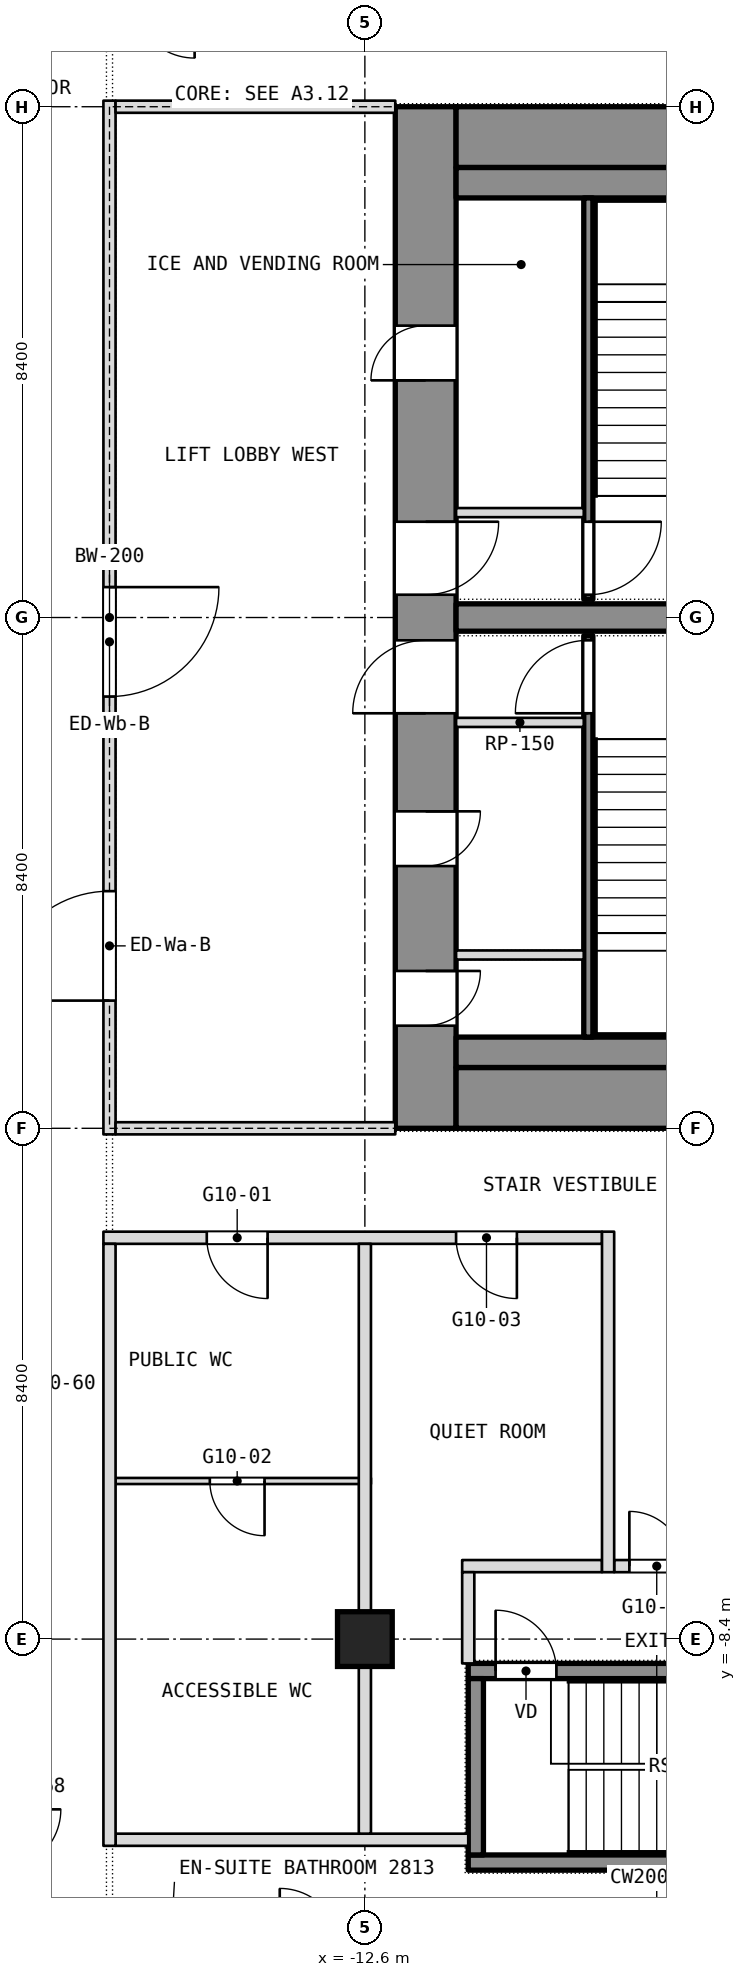
"""IFC4 building model, lengths in metres.
Left out: names, types, materials, properties, quantities, classifications, styles, units other than length and angle.
Written with IfcOpenShell. Run it as: python <this file> out.ifc"""

import sys

from ifc_helpers import new_model, si_unit, direction, frame, frame_2d, origin, origin_2d, place, context, subcontext, project, spatial, rectangle, extrude, element, fill, save


model = new_model("IFC4")
c1 = context("Model", 3, precision=1e-05, world=origin(), true_north=direction((0.0, 1.0)))
c2 = subcontext(c1, "Body", "Model", "MODEL_VIEW")
j1 = project(units=[si_unit("LENGTHUNIT", "METRE"), si_unit("PLANEANGLEUNIT", "RADIAN")], contexts=[c1])
p1 = place(None, origin())
s1 = spatial("IfcSite", under=j1, at=p1, CompositionType="ELEMENT")
p2 = place(p1, origin())
s2 = spatial("IfcBuilding", under=s1, at=p2, CompositionType="ELEMENT")
p3 = place(p2, frame((0.0, 0.0, 126.5)))
s3 = spatial("IfcBuildingStorey", under=s2, at=p3, CompositionType="ELEMENT", Elevation=126.5)
p4 = place(p3, frame((-11.6, 0.0, 0.0), z_axis=(0.0, 0.0, 1.0), x_axis=(0.0, 1.0, 0.0)))
e1 = element("IfcWall", 1, at=p4, inside=s3, PredefinedType="SHEAR", context=c2, shape_type="SweptSolid", body=[
    extrude(rectangle(XDim=16.8, YDim=1.0, at=frame_2d((8.4, 0.0))), origin(), (0.0, 0.0, 1.0), 3.6),
])
p5 = place(p4, frame((1.688, 0.0, 0.0)))
e2 = element("IfcOpeningElement", 2, at=p5, cuts=e1, PredefinedType="OPENING", context=c2, shape_type="SweptSolid", body=[
    extrude(rectangle(XDim=0.9, YDim=2.1, at=frame_2d((0.45, 1.05))), frame((0.0, 0.5, 0.0), z_axis=(0.0, -1.0, 0.0), x_axis=(1.0, 0.0, 0.0)), (0.0, 0.0, 1.0), 1.0),
])
p6 = place(p4, frame((4.312, 0.0, 0.0)))
e3 = element("IfcOpeningElement", 3, at=p6, cuts=e1, PredefinedType="OPENING", context=c2, shape_type="SweptSolid", body=[
    extrude(rectangle(XDim=0.9, YDim=2.1, at=frame_2d((0.45, 1.05))), frame((0.0, 0.5, 0.0), z_axis=(0.0, -1.0, 0.0), x_axis=(1.0, 0.0, 0.0)), (0.0, 0.0, 1.0), 1.0),
])
p7 = place(p4, frame((6.825, 0.0, 0.0)))
e4 = element("IfcOpeningElement", 4, at=p7, cuts=e1, PredefinedType="OPENING", context=c2, shape_type="SweptSolid", body=[
    extrude(rectangle(XDim=1.2, YDim=2.1, at=frame_2d((0.6, 1.05))), frame((0.0, 0.5, 0.0), z_axis=(0.0, -1.0, 0.0), x_axis=(1.0, 0.0, 0.0)), (0.0, 0.0, 1.0), 1.0),
])
p8 = place(p4, frame((12.3, 0.0, 0.0)))
e5 = element("IfcOpeningElement", 5, at=p8, cuts=e1, PredefinedType="OPENING", context=c2, shape_type="SweptSolid", body=[
    extrude(rectangle(XDim=0.9, YDim=2.1, at=frame_2d((0.45, 1.05))), frame((0.0, 0.5, 0.0), z_axis=(0.0, -1.0, 0.0), x_axis=(1.0, 0.0, 0.0)), (0.0, 0.0, 1.0), 1.0),
])
p9 = place(p4, frame((8.775, 0.0, 0.0)))
e6 = element("IfcOpeningElement", 6, at=p9, cuts=e1, PredefinedType="OPENING", context=c2, shape_type="SweptSolid", body=[
    extrude(rectangle(XDim=1.2, YDim=2.1, at=frame_2d((0.6, 1.05))), frame((0.0, 0.5, 0.0), z_axis=(0.0, -1.0, 0.0), x_axis=(1.0, 0.0, 0.0)), (0.0, 0.0, 1.0), 1.0),
])
for number, where, z_axis, x_axis in (
    (7, (-11.1, 0.5, 0.0), (0.0, 0.0, 1.0), (1.0, 0.0, 0.0)),
    (8, (-11.1, 16.3, 0.0), (0.0, 0.0, 1.0), (1.0, 0.0, 0.0)),
):
    element("IfcWall", number, at=place(p3, frame(where, z_axis=z_axis, x_axis=x_axis)), inside=s3, PredefinedType="SHEAR", context=c2, shape_type="SweptSolid", body=[
        extrude(rectangle(XDim=22.2, YDim=1.0, at=frame_2d((11.1, 0.0))), origin(), (0.0, 0.0, 1.0), 3.6),
    ])
p10 = place(p3, frame((-11.1, 8.4, 0.0), z_axis=(0.0, 0.0, 1.0), x_axis=(1.0, 0.0, 0.0)))
e9 = element("IfcWall", 9, at=p10, inside=s3, PredefinedType="SHEAR", context=c2, shape_type="SweptSolid", body=[
    extrude(rectangle(XDim=6.675, YDim=0.45, at=frame_2d((3.337, 0.0))), origin(), (0.0, 0.0, 1.0), 3.6),
])
p11 = place(p3, frame((-12.6, -8.4, 0.0), z_axis=(0.0, 0.0, 1.0), x_axis=(1.0, 0.0, 0.0)))
e10 = element("IfcColumn", 10, at=p11, inside=s3, PredefinedType="COLUMN", context=c2, shape_type="SweptSolid", body=[
    extrude(rectangle(XDim=0.9, YDim=0.9, at=origin_2d()), origin(), (0.0, 0.0, 1.0), 3.6),
])
p12 = place(p3, frame((-16.7, -11.7, 0.0), z_axis=(0.0, 0.0, 1.0), x_axis=(1.0, 0.0, 0.0)))
e11 = element("IfcWall", 11, at=p12, inside=s3, PredefinedType="PARTITIONING", context=c2, shape_type="SweptSolid", body=[
    extrude(rectangle(XDim=5.8, YDim=0.2, at=frame_2d((2.9, 0.0))), origin(), (0.0, 0.0, 1.0), 3.34),
])
p13 = place(p3, frame((-11.0, -7.2, 0.0), z_axis=(0.0, 0.0, 1.0), x_axis=(1.0, 0.0, 0.0)))
e12 = element("IfcWall", 12, at=p13, inside=s3, PredefinedType="PARTITIONING", context=c2, shape_type="SweptSolid", body=[
    extrude(rectangle(XDim=2.3, YDim=0.2, at=frame_2d((1.15, 0.0))), origin(), (0.0, 0.0, 1.0), 3.34),
])
p14 = place(p3, frame((-8.5, -7.2, 0.0), z_axis=(0.0, 0.0, 1.0), x_axis=(1.0, 0.0, 0.0)))
e13 = element("IfcWall", 13, at=p14, inside=s3, PredefinedType="PARTITIONING", context=c2, shape_type="SweptSolid", body=[
    extrude(rectangle(XDim=3.7, YDim=0.2, at=frame_2d((1.85, 0.0))), origin(), (0.0, 0.0, 1.0), 3.34),
])
p15 = place(p14, frame((0.25, 0.0, 0.0)))
e14 = element("IfcOpeningElement", 14, at=p15, cuts=e13, PredefinedType="OPENING", context=c2, shape_type="SweptSolid", body=[
    extrude(rectangle(XDim=0.9, YDim=2.1, at=frame_2d((0.45, 1.05))), frame((0.0, 0.1, 0.0), z_axis=(0.0, -1.0, 0.0), x_axis=(1.0, 0.0, 0.0)), (0.0, 0.0, 1.0), 0.2),
])
p16 = place(p3, frame((-16.7, -5.8, 0.0), z_axis=(0.0, 0.0, 1.0), x_axis=(1.0, 0.0, 0.0)))
e15 = element("IfcWall", 15, at=p16, inside=s3, PredefinedType="PARTITIONING", context=c2, shape_type="SweptSolid", body=[
    extrude(rectangle(XDim=4.2, YDim=0.1, at=frame_2d((2.1, 0.0))), origin(), (0.0, 0.0, 1.0), 3.34),
])
p17 = place(p16, frame((1.55, 0.0, 0.0)))
e16 = element("IfcOpeningElement", 16, at=p17, cuts=e15, PredefinedType="OPENING", context=c2, shape_type="SweptSolid", body=[
    extrude(rectangle(XDim=0.9, YDim=2.1, at=frame_2d((0.45, 1.05))), frame((0.0, 0.05, 0.0), z_axis=(0.0, -1.0, 0.0), x_axis=(1.0, 0.0, 0.0)), (0.0, 0.0, 1.0), 0.1),
])
p18 = place(p3, frame((-16.9, -1.8, 0.0), z_axis=(0.0, 0.0, 1.0), x_axis=(1.0, 0.0, 0.0)))
e17 = element("IfcWall", 17, at=p18, inside=s3, PredefinedType="PARTITIONING", context=c2, shape_type="SweptSolid", body=[
    extrude(rectangle(XDim=8.2, YDim=0.2, at=frame_2d((4.1, 0.0))), origin(), (0.0, 0.0, 1.0), 3.34),
])
p19 = place(p18, frame((1.7, 0.0, 0.0)))
e18 = element("IfcOpeningElement", 18, at=p19, cuts=e17, PredefinedType="OPENING", context=c2, shape_type="SweptSolid", body=[
    extrude(rectangle(XDim=1.0, YDim=2.1, at=frame_2d((0.5, 1.05))), frame((0.0, 0.1, 0.0), z_axis=(0.0, -1.0, 0.0), x_axis=(1.0, 0.0, 0.0)), (0.0, 0.0, 1.0), 0.2),
])
p20 = place(p18, frame((5.8, 0.0, 0.0)))
e19 = element("IfcOpeningElement", 19, at=p20, cuts=e17, PredefinedType="OPENING", context=c2, shape_type="SweptSolid", body=[
    extrude(rectangle(XDim=1.0, YDim=2.1, at=frame_2d((0.5, 1.05))), frame((0.0, 0.1, 0.0), z_axis=(0.0, -1.0, 0.0), x_axis=(1.0, 0.0, 0.0)), (0.0, 0.0, 1.0), 0.2),
])
p21 = place(p3, frame((-8.6, -7.3, 0.0), z_axis=(0.0, 0.0, 1.0), x_axis=(0.0, 1.0, 0.0)))
e20 = element("IfcWall", 20, at=p21, inside=s3, PredefinedType="PARTITIONING", context=c2, shape_type="SweptSolid", body=[
    extrude(rectangle(XDim=5.6, YDim=0.2, at=frame_2d((2.8, 0.0))), origin(), (0.0, 0.0, 1.0), 3.34),
])
p22 = place(p3, frame((-10.9, -8.8, 0.0), z_axis=(0.0, 0.0, 1.0), x_axis=(0.0, 1.0, 0.0)))
e21 = element("IfcWall", 21, at=p22, inside=s3, PredefinedType="PARTITIONING", context=c2, shape_type="SweptSolid", body=[
    extrude(rectangle(XDim=1.5, YDim=0.2, at=frame_2d((0.75, 0.0))), origin(), (0.0, 0.0, 1.0), 3.34),
])
p23 = place(p3, frame((-12.6, -11.6, 0.0), z_axis=(0.0, 0.0, 1.0), x_axis=(0.0, 1.0, 0.0)))
e22 = element("IfcWall", 22, at=p23, inside=s3, PredefinedType="PARTITIONING", context=c2, shape_type="SweptSolid", body=[
    extrude(rectangle(XDim=9.7, YDim=0.2, at=frame_2d((4.85, 0.0))), origin(), (0.0, 0.0, 1.0), 3.34),
])
p24 = place(p3, frame((-16.8, -11.8, 0.0), z_axis=(0.0, 0.0, 1.0), x_axis=(0.0, 1.0, 0.0)))
e23 = element("IfcWall", 23, at=p24, inside=s3, PredefinedType="PARTITIONING", context=c2, shape_type="SweptSolid", body=[
    extrude(rectangle(XDim=9.9, YDim=0.2, at=frame_2d((4.95, 0.0))), origin(), (0.0, 0.0, 1.0), 3.34),
])
for number, where, z_axis, x_axis in (
    (24, (-11.1, 1.25, 0.0), (0.0, 0.0, 1.0), (1.0, 0.0, 0.0)),
    (25, (-11.1, 15.55, 0.0), (0.0, 0.0, 1.0), (1.0, 0.0, 0.0)),
):
    element("IfcWall", number, at=place(p3, frame(where, z_axis=z_axis, x_axis=x_axis)), inside=s3, PredefinedType="PARTITIONING", context=c2, shape_type="SweptSolid", body=[
        extrude(rectangle(XDim=22.2, YDim=0.5, at=frame_2d((11.1, 0.0))), origin(), (0.0, 0.0, 1.0), 3.34),
    ])
p25 = place(p3, frame((-8.925, 1.5, 0.0), z_axis=(0.0, 0.0, 1.0), x_axis=(0.0, 1.0, 0.0)))
e26 = element("IfcWall", 26, at=p25, inside=s3, PredefinedType="SHEAR", context=c2, shape_type="SweptSolid", body=[
    extrude(rectangle(XDim=6.6, YDim=0.15, at=frame_2d((3.3, 0.0))), origin(), (0.0, 0.0, 1.0), 3.34),
])
p26 = place(p25, frame((5.325, 0.0, 0.0)))
e27 = element("IfcOpeningElement", 27, at=p26, cuts=e26, PredefinedType="OPENING", context=c2, shape_type="SweptSolid", body=[
    extrude(rectangle(XDim=1.2, YDim=2.1, at=frame_2d((0.6, 1.05))), frame((0.0, 0.075, 0.0), z_axis=(0.0, -1.0, 0.0), x_axis=(1.0, 0.0, 0.0)), (0.0, 0.0, 1.0), 0.15),
])
for number, where, z_axis, x_axis in (
    (28, (-11.1, 6.675, 0.0), (0.0, 0.0, 1.0), (1.0, 0.0, 0.0)),
    (29, (-11.1, 2.85, 0.0), (0.0, 0.0, 1.0), (1.0, 0.0, 0.0)),
):
    element("IfcWall", number, at=place(p3, frame(where, z_axis=z_axis, x_axis=x_axis)), inside=s3, PredefinedType="PARTITIONING", context=c2, shape_type="SweptSolid", body=[
        extrude(rectangle(XDim=2.1, YDim=0.15, at=frame_2d((1.05, 0.0))), origin(), (0.0, 0.0, 1.0), 3.34),
    ])
p27 = place(p3, frame((-8.925, 8.7, 0.0), z_axis=(0.0, 0.0, 1.0), x_axis=(0.0, 1.0, 0.0)))
e30 = element("IfcWall", 30, at=p27, inside=s3, PredefinedType="SHEAR", context=c2, shape_type="SweptSolid", body=[
    extrude(rectangle(XDim=6.6, YDim=0.15, at=frame_2d((3.3, 0.0))), origin(), (0.0, 0.0, 1.0), 3.34),
])
p28 = place(p27, frame((0.075, 0.0, 0.0)))
e31 = element("IfcOpeningElement", 31, at=p28, cuts=e30, PredefinedType="OPENING", context=c2, shape_type="SweptSolid", body=[
    extrude(rectangle(XDim=1.2, YDim=2.1, at=frame_2d((0.6, 1.05))), frame((0.0, 0.075, 0.0), z_axis=(0.0, -1.0, 0.0), x_axis=(1.0, 0.0, 0.0)), (0.0, 0.0, 1.0), 0.15),
])
p29 = place(p3, frame((-11.1, 10.125, 0.0), z_axis=(0.0, 0.0, 1.0), x_axis=(1.0, 0.0, 0.0)))
e32 = element("IfcWall", 32, at=p29, inside=s3, PredefinedType="PARTITIONING", context=c2, shape_type="SweptSolid", body=[
    extrude(rectangle(XDim=2.1, YDim=0.15, at=frame_2d((1.05, 0.0))), origin(), (0.0, 0.0, 1.0), 3.34),
])
p30 = place(p3, frame((-16.8, -0.1, 0.0), z_axis=(0.0, 0.0, 1.0), x_axis=(0.0, 1.0, 0.0)))
e33 = element("IfcWall", 33, at=p30, inside=s3, PredefinedType="PARTITIONING", context=c2, shape_type="SweptSolid", body=[
    extrude(rectangle(XDim=17.0, YDim=0.2, at=frame_2d((8.5, 0.0))), origin(), (0.0, 0.0, 1.0), 3.34),
])
p31 = place(p30, frame((2.2, 0.0, 0.0)))
e34 = element("IfcOpeningElement", 34, at=p31, cuts=e33, PredefinedType="OPENING", context=c2, shape_type="SweptSolid", body=[
    extrude(rectangle(XDim=1.8, YDim=2.1, at=frame_2d((0.9, 1.05))), frame((0.0, 0.1, 0.0), z_axis=(0.0, -1.0, 0.0), x_axis=(1.0, 0.0, 0.0)), (0.0, 0.0, 1.0), 0.2),
])
p32 = place(p30, frame((7.2, 0.0, 0.0)))
e35 = element("IfcOpeningElement", 35, at=p32, cuts=e33, PredefinedType="OPENING", context=c2, shape_type="SweptSolid", body=[
    extrude(rectangle(XDim=1.8, YDim=2.1, at=frame_2d((0.9, 1.05))), frame((0.0, 0.1, 0.0), z_axis=(0.0, -1.0, 0.0), x_axis=(1.0, 0.0, 0.0)), (0.0, 0.0, 1.0), 0.2),
])
for number, where, z_axis, x_axis in (
    (36, (-16.7, 0.0, 0.0), (0.0, 0.0, 1.0), (1.0, 0.0, 0.0)),
    (37, (-16.7, 16.8, 0.0), (0.0, 0.0, 1.0), (1.0, 0.0, 0.0)),
):
    element("IfcWall", number, at=place(p3, frame(where, z_axis=z_axis, x_axis=x_axis)), inside=s3, PredefinedType="PARTITIONING", context=c2, shape_type="SweptSolid", body=[
        extrude(rectangle(XDim=4.6, YDim=0.2, at=frame_2d((2.3, 0.0))), origin(), (0.0, 0.0, 1.0), 2.89),
    ])
p33 = place(p3, frame((-10.9, -12.075, 0.1), z_axis=(0.0, 0.0, 1.0), x_axis=(1.0, 0.0, 0.0)))
e38 = element("IfcWall", 38, at=p33, inside=s3, PredefinedType="SHEAR", context=c2, shape_type="SweptSolid", body=[
    extrude(rectangle(XDim=6.2, YDim=0.25, at=frame_2d((3.1, 0.0))), origin(), (0.0, 0.0, 1.0), 3.6),
])
p34 = place(p3, frame((-10.9, -8.925, 0.1), z_axis=(0.0, 0.0, 1.0), x_axis=(1.0, 0.0, 0.0)))
e39 = element("IfcWall", 39, at=p34, inside=s3, PredefinedType="SHEAR", context=c2, shape_type="SweptSolid", body=[
    extrude(rectangle(XDim=6.2, YDim=0.25, at=frame_2d((3.1, 0.0))), origin(), (0.0, 0.0, 1.0), 3.6),
])
p35 = place(p34, frame((0.45, 0.0, 0.0)))
e40 = element("IfcOpeningElement", 40, at=p35, cuts=e39, PredefinedType="OPENING", context=c2, shape_type="SweptSolid", body=[
    extrude(rectangle(XDim=1.0, YDim=2.1, at=frame_2d((0.5, 1.05))), frame((0.0, 0.125, 0.0), z_axis=(0.0, -1.0, 0.0), x_axis=(1.0, 0.0, 0.0)), (0.0, 0.0, 1.0), 0.25),
])
p36 = place(p3, frame((-10.775, -11.95, 0.1), z_axis=(0.0, 0.0, 1.0), x_axis=(0.0, 1.0, 0.0)))
e41 = element("IfcWall", 41, at=p36, inside=s3, PredefinedType="SHEAR", context=c2, shape_type="SweptSolid", body=[
    extrude(rectangle(XDim=2.9, YDim=0.25, at=frame_2d((1.45, 0.0))), origin(), (0.0, 0.0, 1.0), 3.6),
])
p37 = place(p15, origin())
e42 = element("IfcDoor", 42, at=p37, inside=s3, OperationType="SINGLE_SWING_RIGHT", PredefinedType="DOOR", context=c2, shape_type="SweptSolid", body=[
    extrude(rectangle(XDim=0.9, YDim=2.1, at=frame_2d((0.45, 1.05))), frame((0.0, 0.025, 0.0), z_axis=(0.0, -1.0, 0.0), x_axis=(1.0, 0.0, 0.0)), (0.0, 0.0, 1.0), 0.05),
])
fill(e14, e42)
p38 = place(p17, origin())
e43 = element("IfcDoor", 43, at=p38, inside=s3, OperationType="SINGLE_SWING_RIGHT", PredefinedType="DOOR", context=c2, shape_type="SweptSolid", body=[
    extrude(rectangle(XDim=0.9, YDim=2.1, at=frame_2d((0.45, 1.05))), frame((0.0, 0.025, 0.0), z_axis=(0.0, -1.0, 0.0), x_axis=(1.0, 0.0, 0.0)), (0.0, 0.0, 1.0), 0.05),
])
fill(e16, e43)
p39 = place(p19, origin())
e44 = element("IfcDoor", 44, at=p39, inside=s3, OperationType="SINGLE_SWING_LEFT", PredefinedType="DOOR", context=c2, shape_type="SweptSolid", body=[
    extrude(rectangle(XDim=1.0, YDim=2.1, at=frame_2d((0.5, 1.05))), frame((0.0, 0.025, 0.0), z_axis=(0.0, -1.0, 0.0), x_axis=(1.0, 0.0, 0.0)), (0.0, 0.0, 1.0), 0.05),
])
fill(e18, e44)
p40 = place(p20, origin())
e45 = element("IfcDoor", 45, at=p40, inside=s3, OperationType="SINGLE_SWING_LEFT", PredefinedType="DOOR", context=c2, shape_type="SweptSolid", body=[
    extrude(rectangle(XDim=1.0, YDim=2.1, at=frame_2d((0.5, 1.05))), frame((0.0, 0.025, 0.0), z_axis=(0.0, -1.0, 0.0), x_axis=(1.0, 0.0, 0.0)), (0.0, 0.0, 1.0), 0.05),
])
fill(e19, e45)
p41 = place(p35, origin())
e46 = element("IfcDoor", 46, at=p41, inside=s3, OperationType="SINGLE_SWING_LEFT", PredefinedType="DOOR", context=c2, shape_type="SweptSolid", body=[
    extrude(rectangle(XDim=1.0, YDim=2.1, at=frame_2d((0.5, 1.05))), frame((0.0, 0.025, 0.0), z_axis=(0.0, -1.0, 0.0), x_axis=(1.0, 0.0, 0.0)), (0.0, 0.0, 1.0), 0.05),
])
fill(e40, e46)
p42 = place(p5, origin())
e47 = element("IfcDoor", 47, at=p42, inside=s3, OperationType="SINGLE_SWING_LEFT", PredefinedType="DOOR", context=c2, shape_type="SweptSolid", body=[
    extrude(rectangle(XDim=0.9, YDim=2.1, at=frame_2d((0.45, 1.05))), frame((0.0, 0.025, 0.0), z_axis=(0.0, -1.0, 0.0), x_axis=(1.0, 0.0, 0.0)), (0.0, 0.0, 1.0), 0.05),
])
fill(e2, e47)
p43 = place(p6, origin())
e48 = element("IfcDoor", 48, at=p43, inside=s3, OperationType="SINGLE_SWING_LEFT", PredefinedType="DOOR", context=c2, shape_type="SweptSolid", body=[
    extrude(rectangle(XDim=0.9, YDim=2.1, at=frame_2d((0.45, 1.05))), frame((0.0, 0.025, 0.0), z_axis=(0.0, -1.0, 0.0), x_axis=(1.0, 0.0, 0.0)), (0.0, 0.0, 1.0), 0.05),
])
fill(e3, e48)
p44 = place(p7, origin())
e49 = element("IfcDoor", 49, at=p44, inside=s3, OperationType="SINGLE_SWING_LEFT", PredefinedType="DOOR", context=c2, shape_type="SweptSolid", body=[
    extrude(rectangle(XDim=1.2, YDim=2.1, at=frame_2d((0.6, 1.05))), frame((0.0, 0.025, 0.0), z_axis=(0.0, -1.0, 0.0), x_axis=(1.0, 0.0, 0.0)), (0.0, 0.0, 1.0), 0.05),
])
fill(e4, e49)
p45 = place(p26, origin())
e50 = element("IfcDoor", 50, at=p45, inside=s3, OperationType="SINGLE_SWING_LEFT", PredefinedType="DOOR", context=c2, shape_type="SweptSolid", body=[
    extrude(rectangle(XDim=1.2, YDim=2.1, at=frame_2d((0.6, 1.05))), frame((0.0, 0.025, 0.0), z_axis=(0.0, -1.0, 0.0), x_axis=(1.0, 0.0, 0.0)), (0.0, 0.0, 1.0), 0.05),
])
fill(e27, e50)
p46 = place(p8, origin())
e51 = element("IfcDoor", 51, at=p46, inside=s3, OperationType="SINGLE_SWING_LEFT", PredefinedType="DOOR", context=c2, shape_type="SweptSolid", body=[
    extrude(rectangle(XDim=0.9, YDim=2.1, at=frame_2d((0.45, 1.05))), frame((0.0, 0.025, 0.0), z_axis=(0.0, -1.0, 0.0), x_axis=(1.0, 0.0, 0.0)), (0.0, 0.0, 1.0), 0.05),
])
fill(e5, e51)
p47 = place(p9, origin())
e52 = element("IfcDoor", 52, at=p47, inside=s3, OperationType="SINGLE_SWING_LEFT", PredefinedType="DOOR", context=c2, shape_type="SweptSolid", body=[
    extrude(rectangle(XDim=1.2, YDim=2.1, at=frame_2d((0.6, 1.05))), frame((0.0, 0.025, 0.0), z_axis=(0.0, -1.0, 0.0), x_axis=(1.0, 0.0, 0.0)), (0.0, 0.0, 1.0), 0.05),
])
fill(e6, e52)
p48 = place(p28, origin())
e53 = element("IfcDoor", 53, at=p48, inside=s3, OperationType="SINGLE_SWING_LEFT", PredefinedType="DOOR", context=c2, shape_type="SweptSolid", body=[
    extrude(rectangle(XDim=1.2, YDim=2.1, at=frame_2d((0.6, 1.05))), frame((0.0, 0.025, 0.0), z_axis=(0.0, -1.0, 0.0), x_axis=(1.0, 0.0, 0.0)), (0.0, 0.0, 1.0), 0.05),
])
fill(e31, e53)
p49 = place(p31, origin())
e54 = element("IfcDoor", 54, at=p49, inside=s3, OperationType="DOUBLE_DOOR_SINGLE_SWING", PredefinedType="DOOR", context=c2, shape_type="SweptSolid", body=[
    extrude(rectangle(XDim=1.8, YDim=2.1, at=frame_2d((0.9, 1.05))), frame((0.0, 0.025, 0.0), z_axis=(0.0, -1.0, 0.0), x_axis=(1.0, 0.0, 0.0)), (0.0, 0.0, 1.0), 0.05),
])
fill(e34, e54)
p50 = place(p32, origin())
e55 = element("IfcDoor", 55, at=p50, inside=s3, OperationType="DOUBLE_DOOR_SINGLE_SWING", PredefinedType="DOOR", context=c2, shape_type="SweptSolid", body=[
    extrude(rectangle(XDim=1.8, YDim=2.1, at=frame_2d((0.9, 1.05))), frame((0.0, 0.025, 0.0), z_axis=(0.0, -1.0, 0.0), x_axis=(1.0, 0.0, 0.0)), (0.0, 0.0, 1.0), 0.05),
])
fill(e35, e55)
save(model, sys.argv[1])
